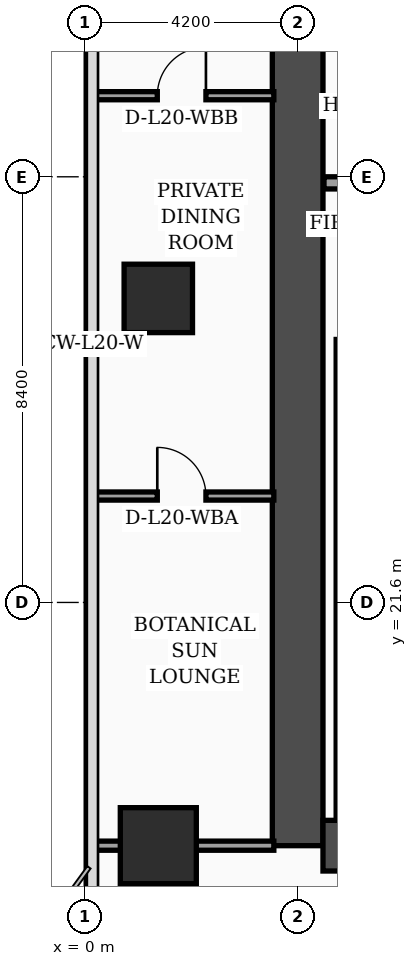
"""IFC4 building model, lengths in metres.
Left out: names, types, materials, properties, quantities, classifications, styles, units other than length and angle.
Written with IfcOpenShell. Run it as: python <this file> out.ifc"""

import sys

from ifc_helpers import new_model, si_unit, direction, frame, frame_2d, origin, origin_2d, place, context, subcontext, project, spatial, rectangle, extrude, element, fill, save


model = new_model("IFC4")
c1 = context("Model", 3, precision=1e-05, world=origin(), true_north=direction((0.0, 1.0)))
c2 = subcontext(c1, "Body", "Model", "MODEL_VIEW")
j1 = project(units=[si_unit("LENGTHUNIT", "METRE"), si_unit("PLANEANGLEUNIT", "RADIAN")], contexts=[c1])
p1 = place(None, origin())
s1 = spatial("IfcSite", under=j1, at=p1, CompositionType="ELEMENT")
p2 = place(p1, origin())
s2 = spatial("IfcBuilding", under=s1, at=p2, CompositionType="ELEMENT")
p3 = place(p2, frame((0.0, 0.0, 85.0)))
s3 = spatial("IfcBuildingStorey", under=s2, at=p3, CompositionType="ELEMENT", Elevation=85.0)
p4 = place(p3, frame((4.2, 16.8, 0.0), z_axis=(0.0, 0.0, 1.0), x_axis=(0.0, 1.0, 0.0)))
e1 = element("IfcWall", 1, at=p4, inside=s3, PredefinedType="SHEAR", context=c2, shape_type="SweptSolid", body=[
    extrude(rectangle(XDim=21.6, YDim=1.0, at=frame_2d((10.8, 0.0))), origin(), (0.0, 0.0, 1.0), 3.56),
])
p5 = place(p3, frame((4.7, 16.8, 0.0), z_axis=(0.0, 0.0, 1.0), x_axis=(1.0, 0.0, 0.0)))
e2 = element("IfcWall", 2, at=p5, inside=s3, PredefinedType="SHEAR", context=c2, shape_type="SweptSolid", body=[
    extrude(rectangle(XDim=9.8, YDim=1.0, at=frame_2d((4.9, 0.0))), origin(), (0.0, 0.0, 1.0), 3.56),
])
p6 = place(p3, frame((5.08, 17.3, 0.0), z_axis=(0.0, 0.0, 1.0), x_axis=(0.0, 1.0, 0.0)))
e3 = element("IfcWall", 3, at=p6, inside=s3, PredefinedType="SOLIDWALL", context=c2, shape_type="SweptSolid", body=[
    extrude(rectangle(XDim=9.49, YDim=0.24, at=frame_2d((4.745, 0.0))), origin(), (0.0, 0.0, 1.0), 3.56),
])
p7 = place(p3, frame((1.45, 16.8, 0.0), z_axis=(0.0, 0.0, 1.0), x_axis=(1.0, 0.0, 0.0)))
e4 = element("IfcColumn", 4, at=p7, inside=s3, PredefinedType="COLUMN", context=c2, shape_type="SweptSolid", body=[
    extrude(rectangle(XDim=1.5, YDim=1.5, at=origin_2d()), origin(), (0.0, 0.0, 1.0), 3.56),
])
p8 = place(p3, frame((1.45, 27.6, 0.0), z_axis=(0.0, 0.0, 1.0), x_axis=(1.0, 0.0, 0.0)))
e5 = element("IfcColumn", 5, at=p8, inside=s3, PredefinedType="COLUMN", context=c2, shape_type="SweptSolid", body=[
    extrude(rectangle(XDim=1.35, YDim=1.35, at=origin_2d()), origin(), (0.0, 0.0, 1.0), 3.56),
])
p9 = place(p3, frame((4.72, 29.88, 0.0), z_axis=(0.0, 0.0, 1.0), x_axis=(1.0, 0.0, 0.0)))
e6 = element("IfcWall", 6, at=p9, inside=s3, PredefinedType="SOLIDWALL", context=c2, shape_type="SweptSolid", body=[
    extrude(rectangle(XDim=4.7, YDim=0.24, at=frame_2d((2.35, 0.0))), origin(), (0.0, 0.0, 1.0), 3.56),
])
p10 = place(p9, frame((0.45, 0.0, 0.0)))
e7 = element("IfcOpeningElement", 7, at=p10, cuts=e6, PredefinedType="OPENING", context=c2, shape_type="SweptSolid", body=[
    extrude(rectangle(XDim=1.3, YDim=2.35, at=frame_2d((0.65, 1.175))), frame((0.0, 0.13, 0.0), z_axis=(0.0, -1.0, 0.0), x_axis=(1.0, 0.0, 0.0)), (0.0, 0.0, 1.0), 0.26),
])
p11 = place(p3, frame((0.08, 23.7, 0.0), z_axis=(0.0, 0.0, 1.0), x_axis=(1.0, 0.0, 0.0)))
e8 = element("IfcWall", 8, at=p11, inside=s3, PredefinedType="PARTITIONING", context=c2, shape_type="SweptSolid", body=[
    extrude(rectangle(XDim=3.65, YDim=0.16, at=frame_2d((1.825, 0.0))), origin(), (0.0, 0.0, 1.0), 3.04),
])
p12 = place(p11, frame((1.35, 0.0, 0.0)))
e9 = element("IfcOpeningElement", 9, at=p12, cuts=e8, PredefinedType="OPENING", context=c2, shape_type="SweptSolid", body=[
    extrude(rectangle(XDim=0.96, YDim=2.2, at=frame_2d((0.48, 1.1))), frame((0.0, 0.09, 0.0), z_axis=(0.0, -1.0, 0.0), x_axis=(1.0, 0.0, 0.0)), (0.0, 0.0, 1.0), 0.18),
])
p13 = place(p3, frame((0.08, 31.6, 0.0), z_axis=(0.0, 0.0, 1.0), x_axis=(1.0, 0.0, 0.0)))
e10 = element("IfcWall", 10, at=p13, inside=s3, PredefinedType="PARTITIONING", context=c2, shape_type="SweptSolid", body=[
    extrude(rectangle(XDim=3.65, YDim=0.16, at=frame_2d((1.825, 0.0))), origin(), (0.0, 0.0, 1.0), 3.04),
])
p14 = place(p13, frame((1.35, 0.0, 0.0)))
e11 = element("IfcOpeningElement", 11, at=p14, cuts=e10, PredefinedType="OPENING", context=c2, shape_type="SweptSolid", body=[
    extrude(rectangle(XDim=0.96, YDim=2.2, at=frame_2d((0.48, 1.1))), frame((0.0, 0.09, 0.0), z_axis=(0.0, -1.0, 0.0), x_axis=(1.0, 0.0, 0.0)), (0.0, 0.0, 1.0), 0.18),
])
p15 = place(p3, frame((0.08, 16.8, 0.0), z_axis=(0.0, 0.0, 1.0), x_axis=(1.0, 0.0, 0.0)))
e12 = element("IfcWall", 12, at=p15, inside=s3, PredefinedType="PARTITIONING", context=c2, shape_type="SweptSolid", body=[
    extrude(rectangle(XDim=3.65, YDim=0.18, at=frame_2d((1.825, 0.0))), origin(), (0.0, 0.0, 1.0), 2.84),
])
p16 = place(p12, origin())
e13 = element("IfcDoor", 13, at=p16, inside=s3, OperationType="SINGLE_SWING_LEFT", PredefinedType="DOOR", context=c2, shape_type="SweptSolid", body=[
    extrude(rectangle(XDim=0.96, YDim=2.2, at=frame_2d((0.48, 1.1))), frame((0.0, 0.025, 0.0), z_axis=(0.0, -1.0, 0.0), x_axis=(1.0, 0.0, 0.0)), (0.0, 0.0, 1.0), 0.05),
])
fill(e9, e13)
p17 = place(p14, origin())
e14 = element("IfcDoor", 14, at=p17, inside=s3, OperationType="SINGLE_SWING_RIGHT", PredefinedType="DOOR", context=c2, shape_type="SweptSolid", body=[
    extrude(rectangle(XDim=0.96, YDim=2.2, at=frame_2d((0.48, 1.1))), frame((0.0, 0.025, 0.0), z_axis=(0.0, -1.0, 0.0), x_axis=(1.0, 0.0, 0.0)), (0.0, 0.0, 1.0), 0.05),
])
fill(e11, e14)
save(model, sys.argv[1])
